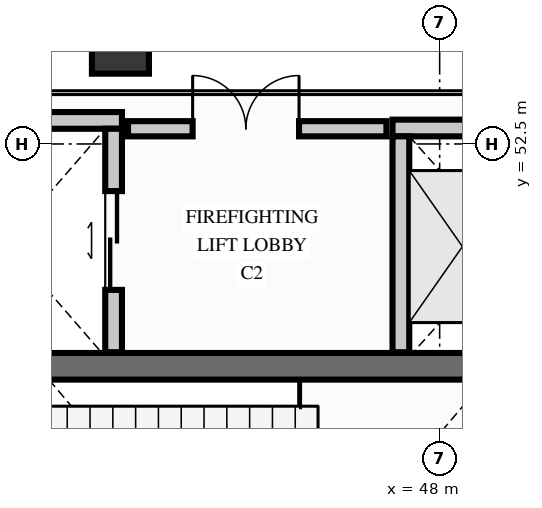
"""IFC4 building model, lengths in metres.
Left out: names, types, materials, properties, quantities, classifications, styles, units other than length and angle.
Written with IfcOpenShell. Run it as: python <this file> out.ifc"""

import sys

from ifc_helpers import new_model, si_unit, direction, frame, frame_2d, origin, origin_2d, place, context, subcontext, project, spatial, rectangle, extrude, element, fill, save


model = new_model("IFC4")
c1 = context("Model", 3, precision=1e-05, world=origin(), true_north=direction((0.0, 1.0)))
c2 = subcontext(c1, "Body", "Model", "MODEL_VIEW")
j1 = project(units=[si_unit("LENGTHUNIT", "METRE"), si_unit("PLANEANGLEUNIT", "RADIAN")], contexts=[c1])
p1 = place(None, origin())
s1 = spatial("IfcSite", under=j1, at=p1, CompositionType="ELEMENT")
p2 = place(p1, origin())
s2 = spatial("IfcBuilding", under=s1, at=p2, CompositionType="ELEMENT")
p3 = place(p2, frame((0.0, 0.0, -4.2)))
s3 = spatial("IfcBuildingStorey", under=s2, at=p3, CompositionType="ELEMENT", Elevation=-4.2)
p4 = place(p3, frame((40.65, 49.575, 0.0), z_axis=(0.0, 0.0, 1.0), x_axis=(1.0, 0.0, 0.0)))
e1 = element("IfcWall", 1, at=p4, inside=s3, PredefinedType="SHEAR", context=c2, shape_type="SweptSolid", body=[
    extrude(rectangle(XDim=8.3, YDim=0.35, at=frame_2d((4.15, 0.0))), origin(), (0.0, 0.0, 1.0), 3.9),
])
p5 = place(p3, frame((43.8, 53.8, 0.0), z_axis=(0.0, 0.0, 1.0), x_axis=(1.0, 0.0, 0.0)))
e2 = element("IfcColumn", 2, at=p5, inside=s3, PredefinedType="COLUMN", context=c2, shape_type="SweptSolid", body=[
    extrude(rectangle(XDim=0.75, YDim=0.75, at=origin_2d()), origin(), (0.0, 0.0, 1.0), 4.2),
])
p6 = place(p3, frame((41.02, 52.81, 0.0), z_axis=(0.0, 0.0, 1.0), x_axis=(1.0, 0.0, 0.0)))
e3 = element("IfcWall", 3, at=p6, inside=s3, PredefinedType="PARTITIONING", context=c2, shape_type="SweptSolid", body=[
    extrude(rectangle(XDim=2.8, YDim=0.22, at=frame_2d((1.4, 0.0))), origin(), (0.0, 0.0, 1.0), 3.88),
])
p7 = place(p3, frame((43.71, 49.76, 0.0), z_axis=(0.0, 0.0, 1.0), x_axis=(0.0, 1.0, 0.0)))
e4 = element("IfcWall", 4, at=p7, inside=s3, PredefinedType="PARTITIONING", context=c2, shape_type="SweptSolid", body=[
    extrude(rectangle(XDim=2.94, YDim=0.22, at=frame_2d((1.47, 0.0))), origin(), (0.0, 0.0, 1.0), 3.88),
])
p8 = place(p7, frame((0.82, 0.0, 0.0)))
e5 = element("IfcOpeningElement", 5, at=p8, cuts=e4, PredefinedType="OPENING", context=c2, shape_type="SweptSolid", body=[
    extrude(rectangle(XDim=1.3, YDim=2.2, at=frame_2d((0.65, 1.1))), frame((0.0, 0.12, 0.0), z_axis=(0.0, -1.0, 0.0), x_axis=(1.0, 0.0, 0.0)), (0.0, 0.0, 1.0), 0.24),
])
p9 = place(p3, frame((47.38, 52.71, 0.0), z_axis=(0.0, 0.0, 1.0), x_axis=(1.0, 0.0, 0.0)))
e6 = element("IfcWall", 6, at=p9, inside=s3, PredefinedType="PARTITIONING", context=c2, shape_type="SweptSolid", body=[
    extrude(rectangle(XDim=3.04, YDim=0.22, at=frame_2d((1.52, 0.0))), origin(), (0.0, 0.0, 1.0), 3.88),
])
p10 = place(p9, frame((0.97, 0.0, 0.0)))
e7 = element("IfcOpeningElement", 7, at=p10, cuts=e6, PredefinedType="OPENING", context=c2, shape_type="SweptSolid", body=[
    extrude(rectangle(XDim=1.1, YDim=2.15, at=frame_2d((0.55, 1.075))), frame((0.0, 0.12, 0.0), z_axis=(0.0, -1.0, 0.0), x_axis=(1.0, 0.0, 0.0)), (0.0, 0.0, 1.0), 0.24),
])
p11 = place(p3, frame((47.49, 49.76, 0.0), z_axis=(0.0, 0.0, 1.0), x_axis=(0.0, 1.0, 0.0)))
e8 = element("IfcWall", 8, at=p11, inside=s3, PredefinedType="PARTITIONING", context=c2, shape_type="SweptSolid", body=[
    extrude(rectangle(XDim=2.84, YDim=0.22, at=frame_2d((1.42, 0.0))), origin(), (0.0, 0.0, 1.0), 3.88),
])
p12 = place(p3, frame((43.9, 52.7, 0.0), z_axis=(0.0, 0.0, 1.0), x_axis=(1.0, 0.0, 0.0)))
e9 = element("IfcWall", 9, at=p12, inside=s3, PredefinedType="PARTITIONING", context=c2, shape_type="SweptSolid", body=[
    extrude(rectangle(XDim=3.4, YDim=0.2, at=frame_2d((1.7, 0.0))), origin(), (0.0, 0.0, 1.0), 3.88),
])
p13 = place(p12, frame((0.85, 0.0, 0.0)))
e10 = element("IfcOpeningElement", 10, at=p13, cuts=e9, PredefinedType="OPENING", context=c2, shape_type="SweptSolid", body=[
    extrude(rectangle(XDim=1.4, YDim=2.25, at=frame_2d((0.7, 1.125))), frame((0.0, 0.11, 0.0), z_axis=(0.0, -1.0, 0.0), x_axis=(1.0, 0.0, 0.0)), (0.0, 0.0, 1.0), 0.22),
])
p14 = place(p8, origin())
e11 = element("IfcDoor", 11, at=p14, inside=s3, OperationType="DOUBLE_DOOR_SLIDING", PredefinedType="DOOR", context=c2, shape_type="SweptSolid", body=[
    extrude(rectangle(XDim=1.3, YDim=2.2, at=frame_2d((0.65, 1.1))), frame((0.0, 0.025, 0.0), z_axis=(0.0, -1.0, 0.0), x_axis=(1.0, 0.0, 0.0)), (0.0, 0.0, 1.0), 0.05),
])
fill(e5, e11)
p15 = place(p13, origin())
e12 = element("IfcDoor", 12, at=p15, inside=s3, OperationType="DOUBLE_DOOR_SINGLE_SWING", PredefinedType="DOOR", context=c2, shape_type="SweptSolid", body=[
    extrude(rectangle(XDim=1.4, YDim=2.25, at=frame_2d((0.7, 1.125))), frame((0.0, 0.025, 0.0), z_axis=(0.0, -1.0, 0.0), x_axis=(1.0, 0.0, 0.0)), (0.0, 0.0, 1.0), 0.05),
])
fill(e10, e12)
save(model, sys.argv[1])
